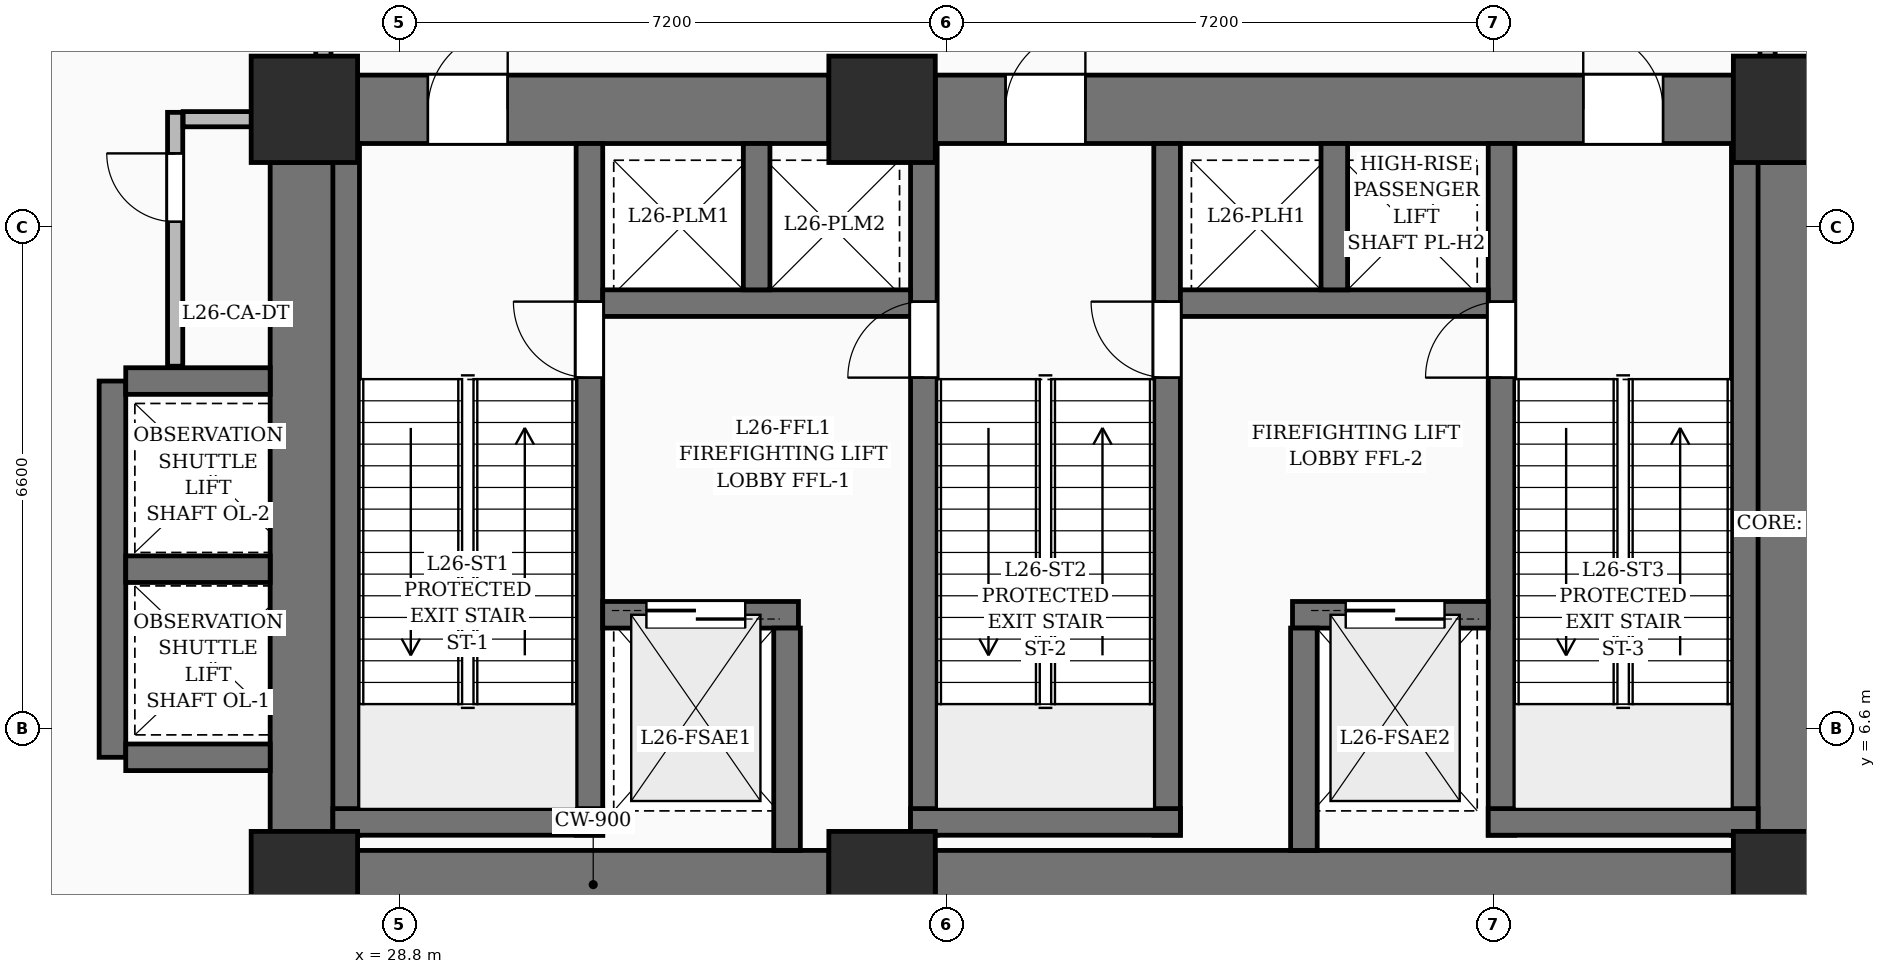
"""IFC4 building model, lengths in metres.
Left out: names, types, materials, properties, quantities, classifications, styles, units other than length and angle.
Written with IfcOpenShell. Run it as: python <this file> out.ifc"""

import sys

from ifc_helpers import new_model, si_unit, direction, frame, frame_2d, origin, origin_2d, place, context, subcontext, project, spatial, rectangle, extrude, element, fill, save


model = new_model("IFC4")
c1 = context("Model", 3, precision=1e-05, world=origin(), true_north=direction((0.0, 1.0)))
c2 = subcontext(c1, "Body", "Model", "MODEL_VIEW")
j1 = project(units=[si_unit("LENGTHUNIT", "METRE"), si_unit("PLANEANGLEUNIT", "RADIAN")], contexts=[c1])
p1 = place(None, origin())
s1 = spatial("IfcSite", under=j1, at=p1, CompositionType="ELEMENT")
p2 = place(p1, origin())
s2 = spatial("IfcBuilding", under=s1, at=p2, CompositionType="ELEMENT")
p3 = place(p2, frame((0.0, 0.0, 105.0)))
s3 = spatial("IfcBuildingStorey", under=s2, at=p3, CompositionType="ELEMENT", Elevation=105.0)
for number, where, z_axis, x_axis in (
    (1, (27.55, 4.55, 0.0), (0.0, 0.0, 1.0), (1.0, 0.0, 0.0)),
    (2, (35.15, 4.55, 0.0), (0.0, 0.0, 1.0), (1.0, 0.0, 0.0)),
    (3, (47.05, 4.55, 0.0), (0.0, 0.0, 1.0), (1.0, 0.0, 0.0)),
    (4, (27.55, 14.75, 0.0), (0.0, 0.0, 1.0), (1.0, 0.0, 0.0)),
    (5, (35.15, 14.75, 0.0), (0.0, 0.0, 1.0), (1.0, 0.0, 0.0)),
    (6, (47.05, 14.75, 0.0), (0.0, 0.0, 1.0), (1.0, 0.0, 0.0)),
):
    element("IfcColumn", number, at=place(p3, frame(where, z_axis=z_axis, x_axis=x_axis)), inside=s3, PredefinedType="COLUMN", context=c2, shape_type="SweptSolid", body=[
        extrude(rectangle(XDim=1.4, YDim=1.4, at=origin_2d()), origin(), (0.0, 0.0, 1.0), 5.4),
    ])
p4 = place(p3, frame((28.25, 4.55, 0.0), z_axis=(0.0, 0.0, 1.0), x_axis=(1.0, 0.0, 0.0)))
e7 = element("IfcWall", 7, at=p4, inside=s3, PredefinedType="SHEAR", context=c2, shape_type="SweptSolid", body=[
    extrude(rectangle(XDim=6.2, YDim=0.9, at=frame_2d((3.1, 0.0))), origin(), (0.0, 0.0, 1.0), 5.4),
])
p5 = place(p3, frame((35.85, 4.55, 0.0), z_axis=(0.0, 0.0, 1.0), x_axis=(1.0, 0.0, 0.0)))
e8 = element("IfcWall", 8, at=p5, inside=s3, PredefinedType="SHEAR", context=c2, shape_type="SweptSolid", body=[
    extrude(rectangle(XDim=10.5, YDim=0.9, at=frame_2d((5.25, 0.0))), origin(), (0.0, 0.0, 1.0), 5.4),
])
p6 = place(p3, frame((28.25, 14.75, 0.0), z_axis=(0.0, 0.0, 1.0), x_axis=(1.0, 0.0, 0.0)))
e9 = element("IfcWall", 9, at=p6, inside=s3, PredefinedType="SHEAR", context=c2, shape_type="SweptSolid", body=[
    extrude(rectangle(XDim=6.2, YDim=0.9, at=frame_2d((3.1, 0.0))), origin(), (0.0, 0.0, 1.0), 5.4),
])
p7 = place(p6, frame((0.925, 0.0, 0.0)))
e10 = element("IfcOpeningElement", 10, at=p7, cuts=e9, PredefinedType="OPENING", context=c2, shape_type="SweptSolid", body=[
    extrude(rectangle(XDim=1.05, YDim=2.15, at=frame_2d((0.525, 1.075))), frame((0.0, 0.46, 0.0), z_axis=(0.0, -1.0, 0.0), x_axis=(1.0, 0.0, 0.0)), (0.0, 0.0, 1.0), 0.92),
])
p8 = place(p3, frame((35.85, 14.75, 0.0), z_axis=(0.0, 0.0, 1.0), x_axis=(1.0, 0.0, 0.0)))
e11 = element("IfcWall", 11, at=p8, inside=s3, PredefinedType="SHEAR", context=c2, shape_type="SweptSolid", body=[
    extrude(rectangle(XDim=10.5, YDim=0.9, at=frame_2d((5.25, 0.0))), origin(), (0.0, 0.0, 1.0), 5.4),
])
p9 = place(p8, frame((0.925, 0.0, 0.0)))
e12 = element("IfcOpeningElement", 12, at=p9, cuts=e11, PredefinedType="OPENING", context=c2, shape_type="SweptSolid", body=[
    extrude(rectangle(XDim=1.05, YDim=2.15, at=frame_2d((0.525, 1.075))), frame((0.0, 0.46, 0.0), z_axis=(0.0, -1.0, 0.0), x_axis=(1.0, 0.0, 0.0)), (0.0, 0.0, 1.0), 0.92),
])
p10 = place(p8, frame((8.525, 0.0, 0.0)))
e13 = element("IfcOpeningElement", 13, at=p10, cuts=e11, PredefinedType="OPENING", context=c2, shape_type="SweptSolid", body=[
    extrude(rectangle(XDim=1.05, YDim=2.15, at=frame_2d((0.525, 1.075))), frame((0.0, 0.46, 0.0), z_axis=(0.0, -1.0, 0.0), x_axis=(1.0, 0.0, 0.0)), (0.0, 0.0, 1.0), 0.92),
])
for number, where, z_axis, x_axis in (
    (14, (27.55, 5.25, 0.0), (0.0, 0.0, 1.0), (0.0, 1.0, 0.0)),
    (15, (47.05, 5.25, 0.0), (0.0, 0.0, 1.0), (0.0, 1.0, 0.0)),
):
    element("IfcWall", number, at=place(p3, frame(where, z_axis=z_axis, x_axis=x_axis)), inside=s3, PredefinedType="SHEAR", context=c2, shape_type="SweptSolid", body=[
        extrude(rectangle(XDim=8.8, YDim=0.9, at=frame_2d((4.4, 0.0))), origin(), (0.0, 0.0, 1.0), 5.4),
    ])
p11 = place(p3, frame((28.1, 5.2, 0.0), z_axis=(0.0, 0.0, 1.0), x_axis=(0.0, 1.0, 0.0)))
e16 = element("IfcWall", 16, at=p11, inside=s3, PredefinedType="SOLIDWALL", context=c2, shape_type="SweptSolid", body=[
    extrude(rectangle(XDim=9.1, YDim=0.35, at=frame_2d((4.55, 0.0))), origin(), (0.0, 0.0, 1.0), 5.4),
])
p12 = place(p3, frame((31.3, 5.2, 0.0), z_axis=(0.0, 0.0, 1.0), x_axis=(0.0, 1.0, 0.0)))
e17 = element("IfcWall", 17, at=p12, inside=s3, PredefinedType="SOLIDWALL", context=c2, shape_type="SweptSolid", body=[
    extrude(rectangle(XDim=9.1, YDim=0.35, at=frame_2d((4.55, 0.0))), origin(), (0.0, 0.0, 1.0), 5.4),
])
p13 = place(p12, frame((6.02, 0.0, 0.0)))
e18 = element("IfcOpeningElement", 18, at=p13, cuts=e17, PredefinedType="OPENING", context=c2, shape_type="SweptSolid", body=[
    extrude(rectangle(XDim=1.0, YDim=2.15, at=frame_2d((0.5, 1.075))), frame((0.0, 0.185, 0.0), z_axis=(0.0, -1.0, 0.0), x_axis=(1.0, 0.0, 0.0)), (0.0, 0.0, 1.0), 0.37),
])
p14 = place(p3, frame((27.925, 5.375, 0.0), z_axis=(0.0, 0.0, 1.0), x_axis=(1.0, 0.0, 0.0)))
e19 = element("IfcWall", 19, at=p14, inside=s3, PredefinedType="SOLIDWALL", context=c2, shape_type="SweptSolid", body=[
    extrude(rectangle(XDim=3.55, YDim=0.35, at=frame_2d((1.775, 0.0))), origin(), (0.0, 0.0, 1.0), 5.4),
])
p15 = place(p3, frame((35.7, 5.2, 0.0), z_axis=(0.0, 0.0, 1.0), x_axis=(0.0, 1.0, 0.0)))
e20 = element("IfcWall", 20, at=p15, inside=s3, PredefinedType="SOLIDWALL", context=c2, shape_type="SweptSolid", body=[
    extrude(rectangle(XDim=9.1, YDim=0.35, at=frame_2d((4.55, 0.0))), origin(), (0.0, 0.0, 1.0), 5.4),
])
p16 = place(p15, frame((6.02, 0.0, 0.0)))
e21 = element("IfcOpeningElement", 21, at=p16, cuts=e20, PredefinedType="OPENING", context=c2, shape_type="SweptSolid", body=[
    extrude(rectangle(XDim=1.0, YDim=2.15, at=frame_2d((0.5, 1.075))), frame((0.0, 0.185, 0.0), z_axis=(0.0, -1.0, 0.0), x_axis=(1.0, 0.0, 0.0)), (0.0, 0.0, 1.0), 0.37),
])
p17 = place(p3, frame((38.9, 5.2, 0.0), z_axis=(0.0, 0.0, 1.0), x_axis=(0.0, 1.0, 0.0)))
e22 = element("IfcWall", 22, at=p17, inside=s3, PredefinedType="SOLIDWALL", context=c2, shape_type="SweptSolid", body=[
    extrude(rectangle(XDim=9.1, YDim=0.35, at=frame_2d((4.55, 0.0))), origin(), (0.0, 0.0, 1.0), 5.4),
])
p18 = place(p17, frame((6.02, 0.0, 0.0)))
e23 = element("IfcOpeningElement", 23, at=p18, cuts=e22, PredefinedType="OPENING", context=c2, shape_type="SweptSolid", body=[
    extrude(rectangle(XDim=1.0, YDim=2.15, at=frame_2d((0.5, 1.075))), frame((0.0, 0.185, 0.0), z_axis=(0.0, -1.0, 0.0), x_axis=(1.0, 0.0, 0.0)), (0.0, 0.0, 1.0), 0.37),
])
p19 = place(p3, frame((35.525, 5.375, 0.0), z_axis=(0.0, 0.0, 1.0), x_axis=(1.0, 0.0, 0.0)))
e24 = element("IfcWall", 24, at=p19, inside=s3, PredefinedType="SOLIDWALL", context=c2, shape_type="SweptSolid", body=[
    extrude(rectangle(XDim=3.55, YDim=0.35, at=frame_2d((1.775, 0.0))), origin(), (0.0, 0.0, 1.0), 5.4),
])
p20 = place(p3, frame((43.3, 5.2, 0.0), z_axis=(0.0, 0.0, 1.0), x_axis=(0.0, 1.0, 0.0)))
e25 = element("IfcWall", 25, at=p20, inside=s3, PredefinedType="SOLIDWALL", context=c2, shape_type="SweptSolid", body=[
    extrude(rectangle(XDim=9.1, YDim=0.35, at=frame_2d((4.55, 0.0))), origin(), (0.0, 0.0, 1.0), 5.4),
])
p21 = place(p20, frame((6.02, 0.0, 0.0)))
e26 = element("IfcOpeningElement", 26, at=p21, cuts=e25, PredefinedType="OPENING", context=c2, shape_type="SweptSolid", body=[
    extrude(rectangle(XDim=1.0, YDim=2.15, at=frame_2d((0.5, 1.075))), frame((0.0, 0.185, 0.0), z_axis=(0.0, -1.0, 0.0), x_axis=(1.0, 0.0, 0.0)), (0.0, 0.0, 1.0), 0.37),
])
p22 = place(p3, frame((46.5, 5.2, 0.0), z_axis=(0.0, 0.0, 1.0), x_axis=(0.0, 1.0, 0.0)))
e27 = element("IfcWall", 27, at=p22, inside=s3, PredefinedType="SOLIDWALL", context=c2, shape_type="SweptSolid", body=[
    extrude(rectangle(XDim=9.1, YDim=0.35, at=frame_2d((4.55, 0.0))), origin(), (0.0, 0.0, 1.0), 5.4),
])
p23 = place(p3, frame((43.125, 5.375, 0.0), z_axis=(0.0, 0.0, 1.0), x_axis=(1.0, 0.0, 0.0)))
e28 = element("IfcWall", 28, at=p23, inside=s3, PredefinedType="SOLIDWALL", context=c2, shape_type="SweptSolid", body=[
    extrude(rectangle(XDim=3.55, YDim=0.35, at=frame_2d((1.775, 0.0))), origin(), (0.0, 0.0, 1.0), 5.4),
])
p24 = place(p3, frame((31.475, 8.1, 0.0), z_axis=(0.0, 0.0, 1.0), x_axis=(1.0, 0.0, 0.0)))
e29 = element("IfcWall", 29, at=p24, inside=s3, PredefinedType="SOLIDWALL", context=c2, shape_type="SweptSolid", body=[
    extrude(rectangle(XDim=2.575, YDim=0.35, at=frame_2d((1.288, 0.0))), origin(), (0.0, 0.0, 1.0), 5.4),
])
p25 = place(p24, frame((0.575, 0.0, 0.0)))
e30 = element("IfcOpeningElement", 30, at=p25, cuts=e29, PredefinedType="OPENING", context=c2, shape_type="SweptSolid", body=[
    extrude(rectangle(XDim=1.3, YDim=2.25, at=frame_2d((0.65, 1.125))), frame((0.0, 0.185, 0.0), z_axis=(0.0, -1.0, 0.0), x_axis=(1.0, 0.0, 0.0)), (0.0, 0.0, 1.0), 0.37),
])
p26 = place(p3, frame((40.55, 8.1, 0.0), z_axis=(0.0, 0.0, 1.0), x_axis=(1.0, 0.0, 0.0)))
e31 = element("IfcWall", 31, at=p26, inside=s3, PredefinedType="SOLIDWALL", context=c2, shape_type="SweptSolid", body=[
    extrude(rectangle(XDim=2.575, YDim=0.35, at=frame_2d((1.288, 0.0))), origin(), (0.0, 0.0, 1.0), 5.4),
])
p27 = place(p26, frame((0.7, 0.0, 0.0)))
e32 = element("IfcOpeningElement", 32, at=p27, cuts=e31, PredefinedType="OPENING", context=c2, shape_type="SweptSolid", body=[
    extrude(rectangle(XDim=1.3, YDim=2.25, at=frame_2d((0.65, 1.125))), frame((0.0, 0.185, 0.0), z_axis=(0.0, -1.0, 0.0), x_axis=(1.0, 0.0, 0.0)), (0.0, 0.0, 1.0), 0.37),
])
for number, where, z_axis, x_axis in (
    (33, (33.9, 5.0, 0.0), (0.0, 0.0, 1.0), (0.0, 1.0, 0.0)),
    (34, (40.7, 5.0, 0.0), (0.0, 0.0, 1.0), (0.0, 1.0, 0.0)),
):
    element("IfcWall", number, at=place(p3, frame(where, z_axis=z_axis, x_axis=x_axis)), inside=s3, PredefinedType="SOLIDWALL", context=c2, shape_type="SweptSolid", body=[
        extrude(rectangle(XDim=2.925, YDim=0.35, at=frame_2d((1.462, 0.0))), origin(), (0.0, 0.0, 1.0), 5.4),
    ])
p28 = place(p3, frame((31.475, 12.2, 0.0), z_axis=(0.0, 0.0, 1.0), x_axis=(1.0, 0.0, 0.0)))
e35 = element("IfcWall", 35, at=p28, inside=s3, PredefinedType="SOLIDWALL", context=c2, shape_type="SweptSolid", body=[
    extrude(rectangle(XDim=4.05, YDim=0.35, at=frame_2d((2.025, 0.0))), origin(), (0.0, 0.0, 1.0), 5.4),
])
p29 = place(p3, frame((33.5, 12.375, 0.0), z_axis=(0.0, 0.0, 1.0), x_axis=(0.0, 1.0, 0.0)))
e36 = element("IfcWall", 36, at=p29, inside=s3, PredefinedType="SOLIDWALL", context=c2, shape_type="SweptSolid", body=[
    extrude(rectangle(XDim=1.925, YDim=0.35, at=frame_2d((0.962, 0.0))), origin(), (0.0, 0.0, 1.0), 5.4),
])
p30 = place(p3, frame((39.075, 12.2, 0.0), z_axis=(0.0, 0.0, 1.0), x_axis=(1.0, 0.0, 0.0)))
e37 = element("IfcWall", 37, at=p30, inside=s3, PredefinedType="SOLIDWALL", context=c2, shape_type="SweptSolid", body=[
    extrude(rectangle(XDim=4.05, YDim=0.35, at=frame_2d((2.025, 0.0))), origin(), (0.0, 0.0, 1.0), 5.4),
])
p31 = place(p3, frame((41.1, 12.375, 0.0), z_axis=(0.0, 0.0, 1.0), x_axis=(0.0, 1.0, 0.0)))
e38 = element("IfcWall", 38, at=p31, inside=s3, PredefinedType="SOLIDWALL", context=c2, shape_type="SweptSolid", body=[
    extrude(rectangle(XDim=1.925, YDim=0.35, at=frame_2d((0.962, 0.0))), origin(), (0.0, 0.0, 1.0), 5.4),
])
p32 = place(p3, frame((25.025, 6.225, 0.0), z_axis=(0.0, 0.0, 1.0), x_axis=(0.0, 1.0, 0.0)))
e39 = element("IfcWall", 39, at=p32, inside=s3, PredefinedType="SOLIDWALL", context=c2, shape_type="SweptSolid", body=[
    extrude(rectangle(XDim=4.95, YDim=0.35, at=frame_2d((2.475, 0.0))), origin(), (0.0, 0.0, 1.0), 5.4),
])
for number, where, z_axis, x_axis in (
    (40, (25.2, 6.225, 0.0), (0.0, 0.0, 1.0), (1.0, 0.0, 0.0)),
    (41, (25.2, 8.7, 0.0), (0.0, 0.0, 1.0), (1.0, 0.0, 0.0)),
    (42, (25.2, 11.175, 0.0), (0.0, 0.0, 1.0), (1.0, 0.0, 0.0)),
):
    element("IfcWall", number, at=place(p3, frame(where, z_axis=z_axis, x_axis=x_axis)), inside=s3, PredefinedType="SOLIDWALL", context=c2, shape_type="SweptSolid", body=[
        extrude(rectangle(XDim=1.9, YDim=0.35, at=frame_2d((0.95, 0.0))), origin(), (0.0, 0.0, 1.0), 5.4),
    ])
p33 = place(p3, frame((9.805, 6.178, 0.0), z_axis=(0.0, 0.0, 1.0), x_axis=(0.539460983853, 0.842010597855, 0.0)))
e43 = element("IfcWall", 43, at=p33, inside=s3, PredefinedType="PARAPET", context=c2, shape_type="SweptSolid", body=[
    extrude(rectangle(XDim=27.45, YDim=0.25, at=frame_2d((13.725, 0.0))), origin(), (0.0, 0.0, 1.0), 1.15),
])
p34 = place(p3, frame((25.85, 11.37, 0.0), z_axis=(0.0, 0.0, 1.0), x_axis=(0.0, 1.0, 0.0)))
e44 = element("IfcWall", 44, at=p34, inside=s3, PredefinedType="PARTITIONING", context=c2, shape_type="SweptSolid", body=[
    extrude(rectangle(XDim=3.34, YDim=0.2, at=frame_2d((1.67, 0.0))), origin(), (0.0, 0.0, 1.0), 5.15),
])
p35 = place(p34, frame((1.9, 0.0, 0.0)))
e45 = element("IfcOpeningElement", 45, at=p35, cuts=e44, PredefinedType="OPENING", context=c2, shape_type="SweptSolid", body=[
    extrude(rectangle(XDim=0.9, YDim=2.1, at=frame_2d((0.45, 1.05))), frame((0.0, 0.11, 0.0), z_axis=(0.0, -1.0, 0.0), x_axis=(1.0, 0.0, 0.0)), (0.0, 0.0, 1.0), 0.22),
])
p36 = place(p3, frame((25.955, 14.62, 0.0), z_axis=(0.0, 0.0, 1.0), x_axis=(1.0, 0.0, 0.0)))
e46 = element("IfcWall", 46, at=p36, inside=s3, PredefinedType="PARTITIONING", context=c2, shape_type="SweptSolid", body=[
    extrude(rectangle(XDim=1.13, YDim=0.2, at=frame_2d((0.565, 0.0))), origin(), (0.0, 0.0, 1.0), 5.15),
])
p37 = place(p3, frame((46.8, 15.2, 0.0), z_axis=(0.0, 0.0, 1.0), x_axis=(0.0, 1.0, 0.0)))
e47 = element("IfcWall", 47, at=p37, inside=s3, PredefinedType="PARTITIONING", context=c2, shape_type="SweptSolid", body=[
    extrude(rectangle(XDim=2.265, YDim=0.2, at=frame_2d((1.133, 0.0))), origin(), (0.0, 0.0, 1.0), 4.236),
])
p38 = place(p37, frame((0.725, 0.0, 0.0)))
e48 = element("IfcOpeningElement", 48, at=p38, cuts=e47, PredefinedType="OPENING", context=c2, shape_type="SweptSolid", body=[
    extrude(rectangle(XDim=0.9, YDim=2.1, at=frame_2d((0.45, 1.05))), frame((0.0, 0.11, 0.0), z_axis=(0.0, -1.0, 0.0), x_axis=(1.0, 0.0, 0.0)), (0.0, 0.0, 1.0), 0.22),
])
p39 = place(p3, frame((27.8, 17.465, 0.0), z_axis=(0.0, 0.0, 1.0), x_axis=(0.0, -1.0, 0.0)))
e49 = element("IfcWall", 49, at=p39, inside=s3, PredefinedType="PARTITIONING", context=c2, shape_type="SweptSolid", body=[
    extrude(rectangle(XDim=2.265, YDim=0.2, at=frame_2d((1.133, 0.0))), origin(), (0.0, 0.0, 1.0), 5.15),
])
p40 = place(p7, origin())
e50 = element("IfcDoor", 50, at=p40, inside=s3, OperationType="SINGLE_SWING_RIGHT", PredefinedType="DOOR", context=c2, shape_type="SweptSolid", body=[
    extrude(rectangle(XDim=1.05, YDim=2.15, at=frame_2d((0.525, 1.075))), frame((0.0, 0.025, 0.0), z_axis=(0.0, -1.0, 0.0), x_axis=(1.0, 0.0, 0.0)), (0.0, 0.0, 1.0), 0.05),
])
fill(e10, e50)
p41 = place(p9, origin())
e51 = element("IfcDoor", 51, at=p41, inside=s3, OperationType="SINGLE_SWING_RIGHT", PredefinedType="DOOR", context=c2, shape_type="SweptSolid", body=[
    extrude(rectangle(XDim=1.05, YDim=2.15, at=frame_2d((0.525, 1.075))), frame((0.0, 0.025, 0.0), z_axis=(0.0, -1.0, 0.0), x_axis=(1.0, 0.0, 0.0)), (0.0, 0.0, 1.0), 0.05),
])
fill(e12, e51)
p42 = place(p10, origin())
e52 = element("IfcDoor", 52, at=p42, inside=s3, OperationType="SINGLE_SWING_LEFT", PredefinedType="DOOR", context=c2, shape_type="SweptSolid", body=[
    extrude(rectangle(XDim=1.05, YDim=2.15, at=frame_2d((0.525, 1.075))), frame((0.0, 0.025, 0.0), z_axis=(0.0, -1.0, 0.0), x_axis=(1.0, 0.0, 0.0)), (0.0, 0.0, 1.0), 0.05),
])
fill(e13, e52)
p43 = place(p13, origin())
e53 = element("IfcDoor", 53, at=p43, inside=s3, OperationType="SINGLE_SWING_RIGHT", PredefinedType="DOOR", context=c2, shape_type="SweptSolid", body=[
    extrude(rectangle(XDim=1.0, YDim=2.15, at=frame_2d((0.5, 1.075))), frame((0.0, 0.025, 0.0), z_axis=(0.0, -1.0, 0.0), x_axis=(1.0, 0.0, 0.0)), (0.0, 0.0, 1.0), 0.05),
])
fill(e18, e53)
p44 = place(p16, origin())
e54 = element("IfcDoor", 54, at=p44, inside=s3, OperationType="SINGLE_SWING_LEFT", PredefinedType="DOOR", context=c2, shape_type="SweptSolid", body=[
    extrude(rectangle(XDim=1.0, YDim=2.15, at=frame_2d((0.5, 1.075))), frame((0.0, 0.025, 0.0), z_axis=(0.0, -1.0, 0.0), x_axis=(1.0, 0.0, 0.0)), (0.0, 0.0, 1.0), 0.05),
])
fill(e21, e54)
p45 = place(p18, origin())
e55 = element("IfcDoor", 55, at=p45, inside=s3, OperationType="SINGLE_SWING_RIGHT", PredefinedType="DOOR", context=c2, shape_type="SweptSolid", body=[
    extrude(rectangle(XDim=1.0, YDim=2.15, at=frame_2d((0.5, 1.075))), frame((0.0, 0.025, 0.0), z_axis=(0.0, -1.0, 0.0), x_axis=(1.0, 0.0, 0.0)), (0.0, 0.0, 1.0), 0.05),
])
fill(e23, e55)
p46 = place(p21, origin())
e56 = element("IfcDoor", 56, at=p46, inside=s3, OperationType="SINGLE_SWING_LEFT", PredefinedType="DOOR", context=c2, shape_type="SweptSolid", body=[
    extrude(rectangle(XDim=1.0, YDim=2.15, at=frame_2d((0.5, 1.075))), frame((0.0, 0.025, 0.0), z_axis=(0.0, -1.0, 0.0), x_axis=(1.0, 0.0, 0.0)), (0.0, 0.0, 1.0), 0.05),
])
fill(e26, e56)
p47 = place(p25, origin())
e57 = element("IfcDoor", 57, at=p47, inside=s3, OperationType="DOUBLE_DOOR_SLIDING", PredefinedType="DOOR", context=c2, shape_type="SweptSolid", body=[
    extrude(rectangle(XDim=1.3, YDim=2.25, at=frame_2d((0.65, 1.125))), frame((0.0, 0.025, 0.0), z_axis=(0.0, -1.0, 0.0), x_axis=(1.0, 0.0, 0.0)), (0.0, 0.0, 1.0), 0.05),
])
fill(e30, e57)
p48 = place(p27, origin())
e58 = element("IfcDoor", 58, at=p48, inside=s3, OperationType="DOUBLE_DOOR_SLIDING", PredefinedType="DOOR", context=c2, shape_type="SweptSolid", body=[
    extrude(rectangle(XDim=1.3, YDim=2.25, at=frame_2d((0.65, 1.125))), frame((0.0, 0.025, 0.0), z_axis=(0.0, -1.0, 0.0), x_axis=(1.0, 0.0, 0.0)), (0.0, 0.0, 1.0), 0.05),
])
fill(e32, e58)
p49 = place(p35, origin())
e59 = element("IfcDoor", 59, at=p49, inside=s3, OperationType="SINGLE_SWING_RIGHT", PredefinedType="DOOR", context=c2, shape_type="SweptSolid", body=[
    extrude(rectangle(XDim=0.9, YDim=2.1, at=frame_2d((0.45, 1.05))), frame((0.0, 0.025, 0.0), z_axis=(0.0, -1.0, 0.0), x_axis=(1.0, 0.0, 0.0)), (0.0, 0.0, 1.0), 0.05),
])
fill(e45, e59)
save(model, sys.argv[1])
